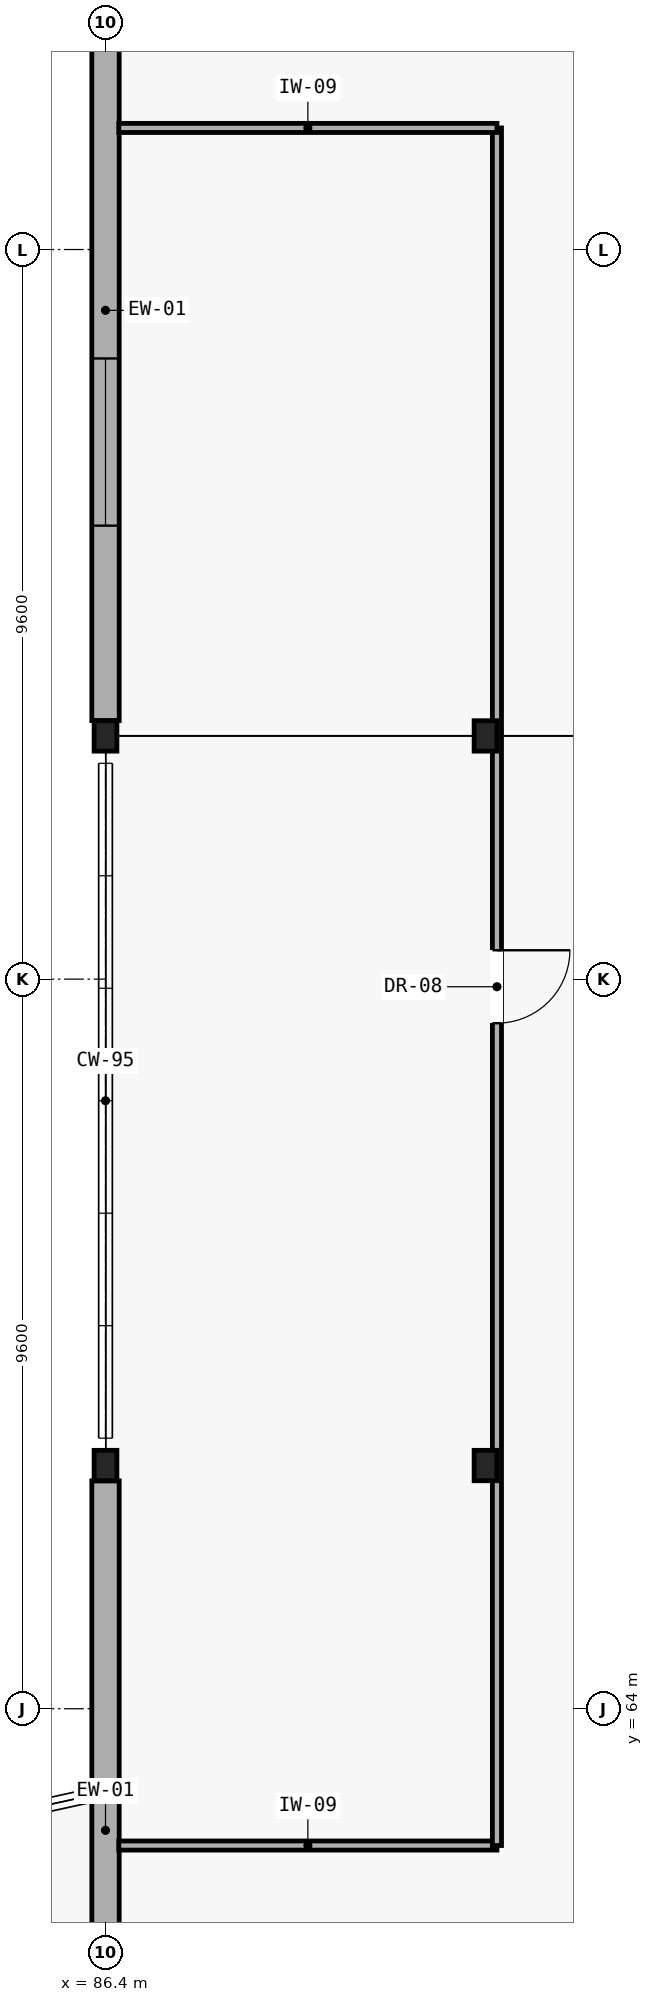
"""IFC4 building model, lengths in metres.
Left out: names, types, materials, properties, quantities, classifications, styles, units other than length and angle.
Written with IfcOpenShell. Run it as: python <this file> out.ifc"""

import sys

from ifc_helpers import new_model, si_unit, direction, frame, frame_2d, origin, origin_2d, place, context, subcontext, project, spatial, rectangle, i_section, extrude, element, fill, save


model = new_model("IFC4")
c1 = context("Model", 3, precision=1e-05, world=origin(), true_north=direction((0.0, 1.0)))
c2 = subcontext(c1, "Body", "Model", "MODEL_VIEW")
j1 = project(units=[si_unit("LENGTHUNIT", "METRE"), si_unit("PLANEANGLEUNIT", "RADIAN")], contexts=[c1])
p1 = place(None, origin())
s1 = spatial("IfcSite", under=j1, at=p1, CompositionType="ELEMENT")
p2 = place(p1, origin())
s2 = spatial("IfcBuilding", under=s1, at=p2, CompositionType="ELEMENT")
p3 = place(p2, frame((0.0, 0.0, 9.45)))
s3 = spatial("IfcBuildingStorey", under=s2, at=p3, CompositionType="ELEMENT", Elevation=9.45)
for number, where, z_axis, x_axis in (
    (1, (86.4, 67.2, 0.0), (0.0, 0.0, 1.0), (1.0, 0.0, 0.0)),
    (2, (91.4, 67.2, 0.0), (0.0, 0.0, 1.0), (1.0, 0.0, 0.0)),
    (3, (86.4, 76.8, 0.0), (0.0, 0.0, 1.0), (1.0, 0.0, 0.0)),
    (4, (91.4, 76.8, 0.0), (0.0, 0.0, 1.0), (1.0, 0.0, 0.0)),
):
    element("IfcColumn", number, at=place(p3, frame(where, z_axis=z_axis, x_axis=x_axis)), inside=s3, PredefinedType="COLUMN", context=c2, shape_type="SweptSolid", body=[
        extrude(i_section(OverallWidth=0.3, OverallDepth=0.4, WebThickness=0.013, FlangeThickness=0.024, FilletRadius=0.027, at=origin_2d()), origin(), (0.0, 0.0, 1.0), 4.2),
    ])
p4 = place(p3, frame((86.4, 57.802, 0.0), z_axis=(0.0, 0.0, 1.0), x_axis=(0.0, 1.0, 0.0)))
e5 = element("IfcWall", 5, at=p4, inside=s3, PredefinedType="SOLIDWALL", context=c2, shape_type="SweptSolid", body=[
    extrude(rectangle(XDim=9.196, YDim=0.36, at=frame_2d((4.598, 0.0))), origin(), (0.0, 0.0, 1.0), 3.505),
])
p5 = place(p4, frame((1.798, 0.0, 0.0)))
e6 = element("IfcOpeningElement", 6, at=p5, cuts=e5, PredefinedType="OPENING", context=c2, shape_type="SweptSolid", body=[
    extrude(rectangle(XDim=1.5, YDim=2.2, at=frame_2d((0.75, 1.1))), frame((0.0, 0.19, 0.0), z_axis=(0.0, -1.0, 0.0), x_axis=(1.0, 0.0, 0.0)), (0.0, 0.0, 1.0), 0.38),
])
p6 = place(p3, frame((86.4, 77.002, 0.0), z_axis=(0.0, 0.0, 1.0), x_axis=(0.0, 1.0, 0.0)))
e7 = element("IfcWall", 7, at=p6, inside=s3, PredefinedType="SOLIDWALL", context=c2, shape_type="SweptSolid", body=[
    extrude(rectangle(XDim=10.796, YDim=0.36, at=frame_2d((5.398, 0.0))), origin(), (0.0, 0.0, 1.0), 3.505),
])
p7 = place(p6, frame((2.565, 0.0, 0.9)))
e8 = element("IfcOpeningElement", 8, at=p7, cuts=e7, PredefinedType="OPENING", context=c2, shape_type="SweptSolid", body=[
    extrude(rectangle(XDim=2.2, YDim=1.15, at=frame_2d((1.1, 0.575))), frame((0.0, 0.19, 0.0), z_axis=(0.0, -1.0, 0.0), x_axis=(1.0, 0.0, 0.0)), (0.0, 0.0, 1.0), 0.38),
])
p8 = place(p3, frame((86.575, 62.2, 0.0), z_axis=(0.0, 0.0, 1.0), x_axis=(1.0, 0.0, 0.0)))
e9 = element("IfcWall", 9, at=p8, inside=s3, PredefinedType="PARTITIONING", context=c2, shape_type="SweptSolid", body=[
    extrude(rectangle(XDim=4.975, YDim=0.12, at=frame_2d((2.488, 0.0))), origin(), (0.0, 0.0, 1.0), 3.97),
])
p9 = place(p3, frame((91.55, 62.2, 0.0), z_axis=(0.0, 0.0, 1.0), x_axis=(0.0, 1.0, 0.0)))
e10 = element("IfcWall", 10, at=p9, inside=s3, PredefinedType="PARTITIONING", context=c2, shape_type="SweptSolid", body=[
    extrude(rectangle(XDim=22.6, YDim=0.12, at=frame_2d((11.3, 0.0))), origin(), (0.0, 0.0, 1.0), 3.505),
])
p10 = place(p9, frame((10.82, 0.0, 0.0)))
e11 = element("IfcOpeningElement", 11, at=p10, cuts=e10, PredefinedType="OPENING", context=c2, shape_type="SweptSolid", body=[
    extrude(rectangle(XDim=0.96, YDim=2.08, at=frame_2d((0.48, 1.04))), frame((0.0, 0.07, 0.0), z_axis=(0.0, -1.0, 0.0), x_axis=(1.0, 0.0, 0.0)), (0.0, 0.0, 1.0), 0.14),
])
p11 = place(p3, frame((91.55, 84.8, 0.0), z_axis=(0.0, 0.0, 1.0), x_axis=(-1.0, 0.0, 0.0)))
e12 = element("IfcWall", 12, at=p11, inside=s3, PredefinedType="PARTITIONING", context=c2, shape_type="SweptSolid", body=[
    extrude(rectangle(XDim=4.975, YDim=0.12, at=frame_2d((2.488, 0.0))), origin(), (0.0, 0.0, 1.0), 3.97),
])
p12 = place(p7, origin())
e13 = element("IfcWindow", 13, at=p12, inside=s3, PartitioningType="SINGLE_PANEL", PredefinedType="WINDOW", context=c2, shape_type="SweptSolid", body=[
    extrude(rectangle(XDim=2.2, YDim=1.15, at=frame_2d((1.1, 0.575))), frame((0.0, 0.03, 0.0), z_axis=(0.0, -1.0, 0.0), x_axis=(1.0, 0.0, 0.0)), (0.0, 0.0, 1.0), 0.06),
])
fill(e8, e13)
p13 = place(p10, frame((0.96, 0.0, 0.0), z_axis=(0.0, 0.0, 1.0), x_axis=(-1.0, 0.0, 0.0)))
e14 = element("IfcDoor", 14, at=p13, inside=s3, OperationType="SINGLE_SWING_RIGHT", PredefinedType="DOOR", context=c2, shape_type="SweptSolid", body=[
    extrude(rectangle(XDim=0.96, YDim=2.08, at=frame_2d((0.48, 1.04))), frame((0.0, 0.025, 0.0), z_axis=(0.0, -1.0, 0.0), x_axis=(1.0, 0.0, 0.0)), (0.0, 0.0, 1.0), 0.05),
])
fill(e11, e14)
save(model, sys.argv[1])
